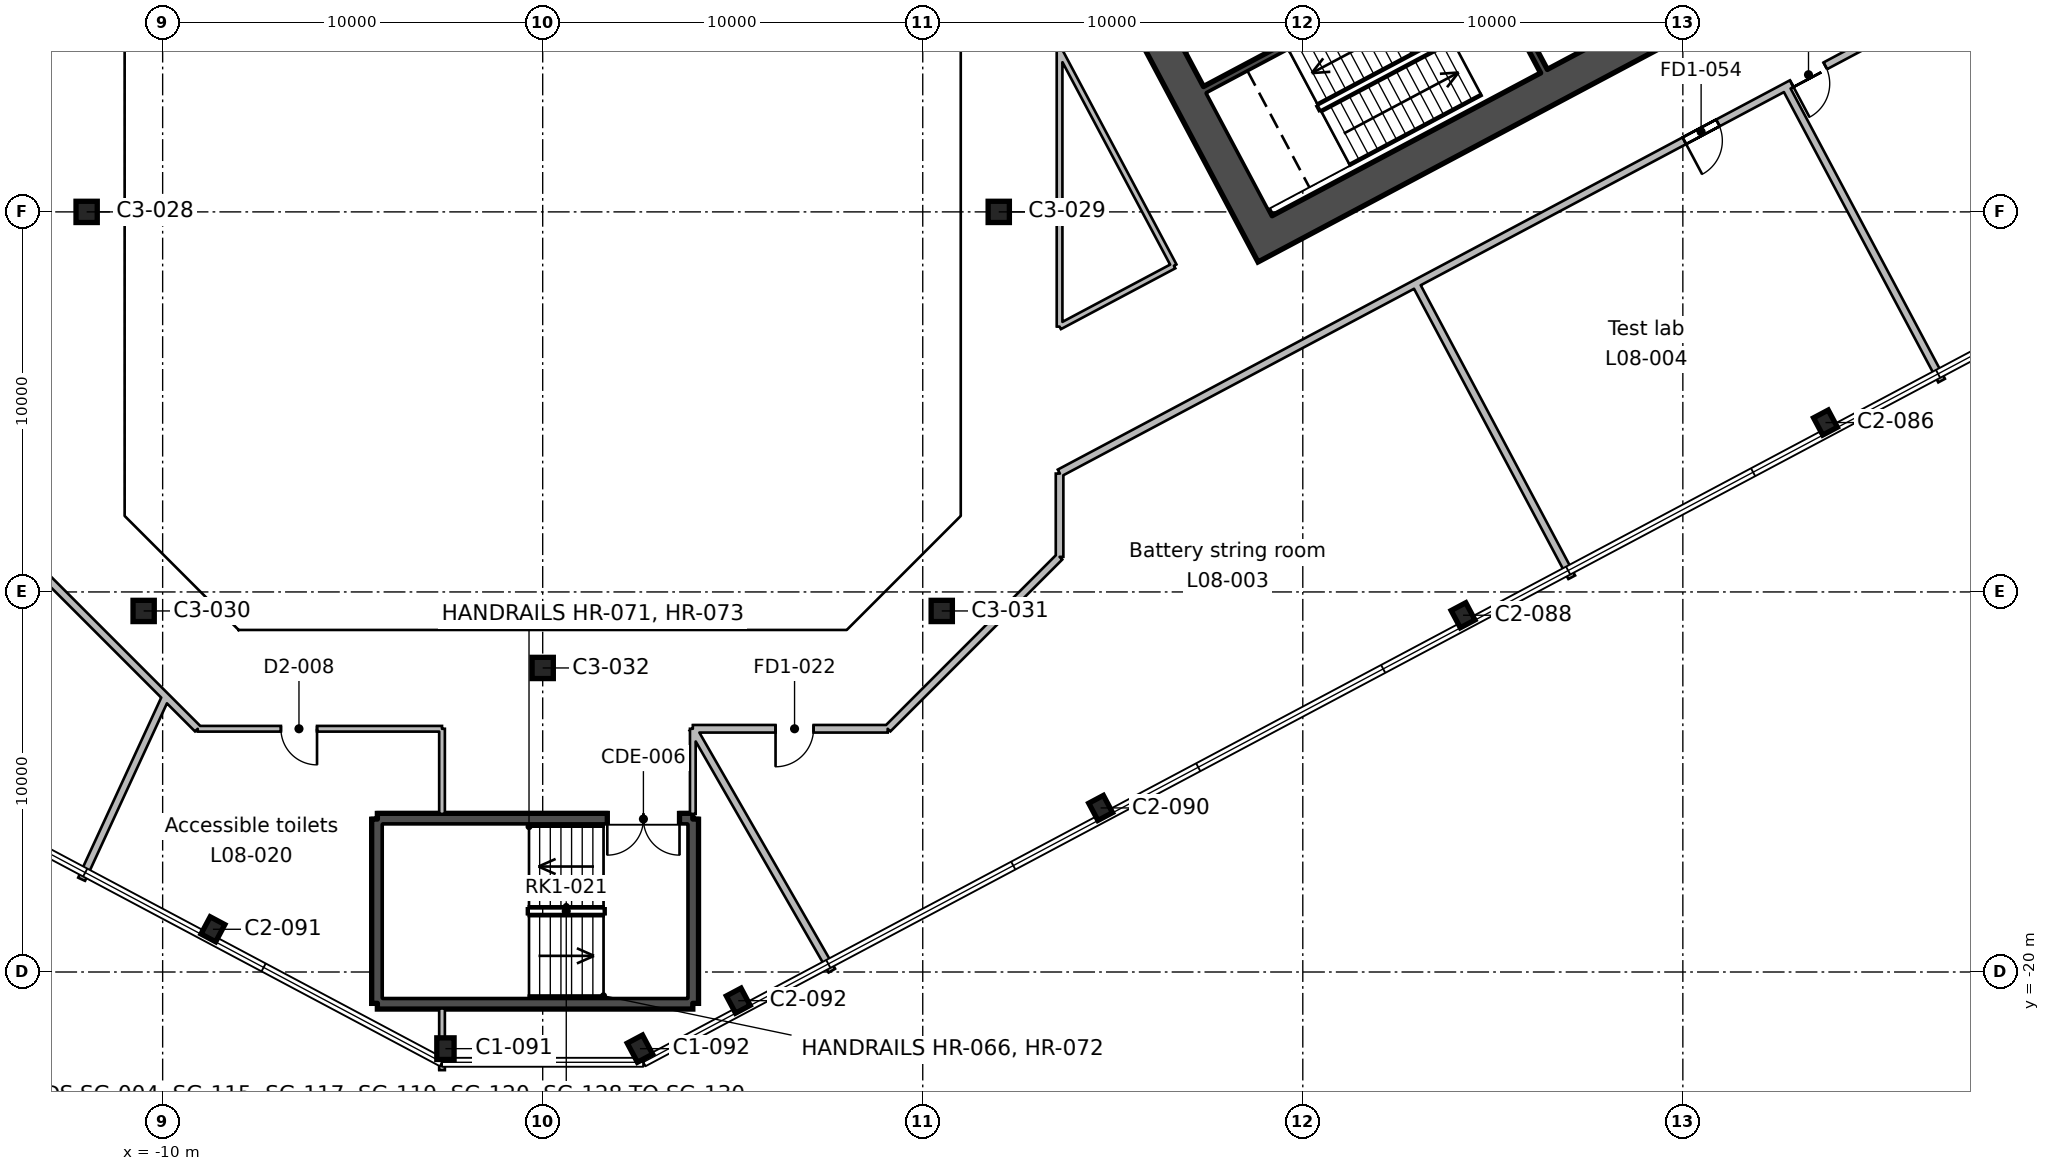
"""IFC4 building model, lengths in metres.
Left out: names, types, materials, properties, quantities, classifications, styles, units other than length and angle.
Written with IfcOpenShell. Run it as: python <this file> out.ifc"""

import sys

from ifc_helpers import new_model, si_unit, direction, frame, frame_2d, origin, origin_2d, place, context, subcontext, project, spatial, rectangle, hollow_rectangle, i_section, extrude, element, fill, save


model = new_model("IFC4")
c1 = context("Model", 3, precision=1e-05, world=origin(), true_north=direction((0.0, 1.0)))
c2 = subcontext(c1, "Body", "Model", "MODEL_VIEW")
j1 = project(units=[si_unit("LENGTHUNIT", "METRE"), si_unit("PLANEANGLEUNIT", "RADIAN")], contexts=[c1])
p1 = place(None, origin())
s1 = spatial("IfcSite", under=j1, at=p1, CompositionType="ELEMENT")
p2 = place(p1, origin())
s2 = spatial("IfcBuilding", under=s1, at=p2, CompositionType="ELEMENT")
p3 = place(p2, frame((0.0, 0.0, 44.6)))
s3 = spatial("IfcBuildingStorey", under=s2, at=p3, CompositionType="ELEMENT", Elevation=44.6)
for number, where, z_axis, x_axis in (
    (1, (-2.559, -22.017, 0.0), (0.0, 0.0, 1.0), (1.0, 0.0, 0.0)),
    (2, (2.559, -22.017, 0.0), (0.0, 0.0, 1.0), (0.883, 0.469, 0.0)),
):
    element("IfcColumn", number, at=place(p3, frame(where, z_axis=z_axis, x_axis=x_axis)), inside=s3, PredefinedType="COLUMN", context=c2, shape_type="SweptSolid", body=[
        extrude(i_section(OverallWidth=0.455, OverallDepth=0.569, WebThickness=0.078, FlangeThickness=0.125, FilletRadius=0.015, at=origin_2d()), origin(), (0.0, 0.0, 1.0), 5.4),
    ])
for number, where, z_axis, x_axis in (
    (3, (5.146, -20.754, 0.0), (0.0, 0.0, 1.0), (0.883, 0.469, 0.0)),
    (4, (-8.677, -18.876, 0.0), (0.0, 0.0, 1.0), (0.883, -0.469, 0.0)),
    (5, (14.681, -15.683, 0.0), (0.0, 0.0, 1.0), (0.883, 0.469, 0.0)),
):
    element("IfcColumn", number, at=place(p3, frame(where, z_axis=z_axis, x_axis=x_axis)), inside=s3, PredefinedType="COLUMN", context=c2, shape_type="SweptSolid", body=[
        extrude(i_section(OverallWidth=0.437, OverallDepth=0.513, WebThickness=0.061, FlangeThickness=0.097, FilletRadius=0.015, at=origin_2d()), origin(), (0.0, 0.0, 1.0), 5.4),
    ])
p4 = place(p3, frame((0.0, -12.0, 0.0), z_axis=(0.0, 0.0, 1.0), x_axis=(1.0, 0.0, 0.0)))
e6 = element("IfcColumn", 6, at=p4, inside=s3, PredefinedType="COLUMN", context=c2, shape_type="SweptSolid", body=[
    extrude(hollow_rectangle(XDim=0.559, YDim=0.559, WallThickness=0.024, InnerFilletRadius=0.012, OuterFilletRadius=0.035, at=origin_2d()), origin(), (0.0, 0.0, 1.0), 5.4),
])
p5 = place(p3, frame((24.217, -10.613, 0.0), z_axis=(0.0, 0.0, 1.0), x_axis=(0.882947592859, 0.469471562786, 0.0)))
e7 = element("IfcColumn", 7, at=p5, inside=s3, PredefinedType="COLUMN", context=c2, shape_type="SweptSolid", body=[
    extrude(i_section(OverallWidth=0.437, OverallDepth=0.513, WebThickness=0.061, FlangeThickness=0.097, FilletRadius=0.015, at=origin_2d()), origin(), (0.0, 0.0, 1.0), 5.4),
])
for number, where, z_axis, x_axis in (
    (8, (-10.5, -10.5, 0.0), (0.0, 0.0, 1.0), (1.0, 0.0, 0.0)),
    (9, (10.5, -10.5, 0.0), (0.0, 0.0, 1.0), (1.0, 0.0, 0.0)),
):
    element("IfcColumn", number, at=place(p3, frame(where, z_axis=z_axis, x_axis=x_axis)), inside=s3, PredefinedType="COLUMN", context=c2, shape_type="SweptSolid", body=[
        extrude(hollow_rectangle(XDim=0.559, YDim=0.559, WallThickness=0.024, InnerFilletRadius=0.012, OuterFilletRadius=0.035, at=origin_2d()), origin(), (0.0, 0.0, 1.0), 5.4),
    ])
p6 = place(p3, frame((33.753, -5.543, 0.0), z_axis=(0.0, 0.0, 1.0), x_axis=(0.882947592859, 0.469471562786, 0.0)))
e10 = element("IfcColumn", 10, at=p6, inside=s3, PredefinedType="COLUMN", context=c2, shape_type="SweptSolid", body=[
    extrude(i_section(OverallWidth=0.437, OverallDepth=0.513, WebThickness=0.061, FlangeThickness=0.097, FilletRadius=0.015, at=origin_2d()), origin(), (0.0, 0.0, 1.0), 5.4),
])
for number, where, z_axis, x_axis in (
    (11, (-12.0, 0.0, 0.0), (0.0, 0.0, 1.0), (1.0, 0.0, 0.0)),
    (12, (12.0, 0.0, 0.0), (0.0, 0.0, 1.0), (1.0, 0.0, 0.0)),
):
    element("IfcColumn", number, at=place(p3, frame(where, z_axis=z_axis, x_axis=x_axis)), inside=s3, PredefinedType="COLUMN", context=c2, shape_type="SweptSolid", body=[
        extrude(hollow_rectangle(XDim=0.559, YDim=0.559, WallThickness=0.024, InnerFilletRadius=0.012, OuterFilletRadius=0.035, at=origin_2d()), origin(), (0.0, 0.0, 1.0), 5.4),
    ])
p7 = place(p3, frame((19.219, -1.107, 0.0), z_axis=(0.0, 0.0, 1.0), x_axis=(-0.46947084998, 0.882947971864, 0.0)))
e13 = element("IfcWall", 13, at=p7, inside=s3, PredefinedType="SHEAR", context=c2, shape_type="SweptSolid", body=[
    extrude(rectangle(XDim=20.0, YDim=0.9, at=frame_2d((10.0, 0.0))), origin(), (0.0, 0.0, 1.0), 5.4),
])
p8 = place(p7, frame((7.0, 0.0, 0.0)))
e14 = element("IfcOpeningElement", 14, at=p8, cuts=e13, PredefinedType="OPENING", context=c2, shape_type="SweptSolid", body=[
    extrude(rectangle(XDim=2.4, YDim=2.4, at=frame_2d((1.2, 1.2))), frame((0.0, 0.46, 0.0), z_axis=(0.0, -1.0, 0.0), x_axis=(1.0, 0.0, 0.0)), (0.0, 0.0, 1.0), 0.92),
])
p9 = place(p3, frame((19.405, -0.498, 0.0), z_axis=(0.0, 0.0, 1.0), x_axis=(0.88294509198, 0.469476266226, 0.0)))
e15 = element("IfcWall", 15, at=p9, inside=s3, PredefinedType="SHEAR", context=c2, shape_type="SweptSolid", body=[
    extrude(rectangle(XDim=20.2, YDim=0.9, at=frame_2d((10.1, 0.0))), origin(), (0.0, 0.0, 1.0), 5.4),
])
p10 = place(p3, frame((26.346, 3.702, 0.0), z_axis=(0.0, 0.0, 1.0), x_axis=(-0.469480409012, 0.88294288918, 0.0)))
e16 = element("IfcWall", 16, at=p10, inside=s3, PredefinedType="SHEAR", context=c2, shape_type="SweptSolid", body=[
    extrude(rectangle(XDim=7.3, YDim=0.2, at=frame_2d((3.65, 0.0))), origin(), (0.0, 0.0, 1.0), 5.4),
])
p11 = place(p10, frame((1.3, 0.0, 0.0)))
e17 = element("IfcOpeningElement", 17, at=p11, cuts=e16, PredefinedType="OPENING", context=c2, shape_type="SweptSolid", body=[
    extrude(rectangle(XDim=1.2, YDim=2.1, at=frame_2d((0.6, 1.05))), frame((0.0, 0.11, 0.0), z_axis=(0.0, -1.0, 0.0), x_axis=(1.0, 0.0, 0.0)), (0.0, 0.0, 1.0), 0.22),
])
p12 = place(p3, frame((17.434, 3.21, 0.0), z_axis=(0.0, 0.0, 1.0), x_axis=(0.882940221191, 0.469485426614, 0.0)))
e18 = element("IfcWall", 18, at=p12, inside=s3, PredefinedType="SHEAR", context=c2, shape_type="SweptSolid", body=[
    extrude(rectangle(XDim=8.0, YDim=0.2, at=frame_2d((4.0, 0.0))), origin(), (0.0, 0.0, 1.0), 5.4),
])
p13 = place(p3, frame((3.95, -15.975, 0.0), z_axis=(0.0, 0.0, 1.0), x_axis=(0.0, -1.0, 0.0)))
e19 = element("IfcWall", 19, at=p13, inside=s3, PredefinedType="SHEAR", context=c2, shape_type="SweptSolid", body=[
    extrude(rectangle(XDim=4.85, YDim=0.3, at=frame_2d((2.425, 0.0))), origin(), (0.0, 0.0, 1.0), 5.4),
])
p14 = place(p3, frame((3.95, -20.825, 0.0), z_axis=(0.0, 0.0, 1.0), x_axis=(-1.0, 0.0, 0.0)))
e20 = element("IfcWall", 20, at=p14, inside=s3, PredefinedType="SHEAR", context=c2, shape_type="SweptSolid", body=[
    extrude(rectangle(XDim=8.3, YDim=0.3, at=frame_2d((4.15, 0.0))), origin(), (0.0, 0.0, 1.0), 5.4),
])
p15 = place(p3, frame((-4.35, -20.825, 0.0), z_axis=(0.0, 0.0, 1.0), x_axis=(0.0, 1.0, 0.0)))
e21 = element("IfcWall", 21, at=p15, inside=s3, PredefinedType="SHEAR", context=c2, shape_type="SweptSolid", body=[
    extrude(rectangle(XDim=4.85, YDim=0.3, at=frame_2d((2.425, 0.0))), origin(), (0.0, 0.0, 1.0), 5.4),
])
p16 = place(p3, frame((-4.35, -15.975, 0.0), z_axis=(0.0, 0.0, 1.0), x_axis=(1.0, 0.0, 0.0)))
e22 = element("IfcWall", 22, at=p16, inside=s3, PredefinedType="SHEAR", context=c2, shape_type="SweptSolid", body=[
    extrude(rectangle(XDim=8.3, YDim=0.3, at=frame_2d((4.15, 0.0))), origin(), (0.0, 0.0, 1.0), 5.4),
])
p17 = place(p16, frame((6.05, 0.0, 0.0)))
e23 = element("IfcOpeningElement", 23, at=p17, cuts=e22, PredefinedType="OPENING", context=c2, shape_type="SweptSolid", body=[
    extrude(rectangle(XDim=1.9, YDim=2.1, at=frame_2d((0.95, 1.05))), frame((0.0, 0.16, 0.0), z_axis=(0.0, -1.0, 0.0), x_axis=(1.0, 0.0, 0.0)), (0.0, 0.0, 1.0), 0.32),
])
p18 = place(p3, frame((-20.142, 0.46, 0.0), z_axis=(0.0, 0.0, 1.0), x_axis=(0.469506937019, 0.882928783136, 0.0)))
e24 = element("IfcWall", 24, at=p18, inside=s3, PredefinedType="PARTITIONING", context=c2, shape_type="SweptSolid", body=[
    extrude(rectangle(XDim=18.1, YDim=0.15, at=frame_2d((9.05, 0.0))), origin(), (0.0, 0.0, 1.0), 4.95),
])
p19 = place(p18, frame((8.55, 0.0, 0.0)))
e25 = element("IfcOpeningElement", 25, at=p19, cuts=e24, PredefinedType="OPENING", context=c2, shape_type="SweptSolid", body=[
    extrude(rectangle(XDim=1.0, YDim=2.1, at=frame_2d((0.5, 1.05))), frame((0.0, 0.085, 0.0), z_axis=(0.0, -1.0, 0.0), x_axis=(1.0, 0.0, 0.0)), (0.0, 0.0, 1.0), 0.17),
])
p20 = place(p3, frame((-9.918, -12.759, 0.0), z_axis=(0.0, 0.0, 1.0), x_axis=(-0.707106781187, 0.707106781187, 0.0)))
e26 = element("IfcWall", 26, at=p20, inside=s3, PredefinedType="PARTITIONING", context=c2, shape_type="SweptSolid", body=[
    extrude(rectangle(XDim=5.207, YDim=0.2, at=frame_2d((2.604, 0.0))), origin(), (0.0, 0.0, 1.0), 4.95),
])
p21 = place(p3, frame((-9.918, -12.759, 0.0), z_axis=(0.0, 0.0, 1.0), x_axis=(-0.41878582264, -0.908085037183, 0.0)))
e27 = element("IfcWall", 27, at=p21, inside=s3, PredefinedType="PARTITIONING", context=c2, shape_type="SweptSolid", body=[
    extrude(rectangle(XDim=5.287, YDim=0.2, at=frame_2d((2.644, 0.0))), origin(), (0.0, 0.0, 1.0), 4.95),
])
p22 = place(p3, frame((-3.888, -13.6, 0.0), z_axis=(0.0, 0.0, 1.0), x_axis=(-1.0, 0.0, 0.0)))
e28 = element("IfcWall", 28, at=p22, inside=s3, PredefinedType="PARTITIONING", context=c2, shape_type="SweptSolid", body=[
    extrude(rectangle(XDim=5.189, YDim=0.15, at=frame_2d((2.594, 0.0))), origin(), (0.0, 0.0, 1.0), 4.95),
])
p23 = place(p22, frame((2.05, 0.0, 0.0)))
e29 = element("IfcOpeningElement", 29, at=p23, cuts=e28, PredefinedType="OPENING", context=c2, shape_type="SweptSolid", body=[
    extrude(rectangle(XDim=0.95, YDim=2.1, at=frame_2d((0.475, 1.05))), frame((0.0, 0.085, 0.0), z_axis=(0.0, -1.0, 0.0), x_axis=(1.0, 0.0, 0.0)), (0.0, 0.0, 1.0), 0.17),
])
p24 = place(p3, frame((-9.077, -13.6, 0.0), z_axis=(0.0, 0.0, 1.0), x_axis=(-0.707106781187, 0.707106781187, 0.0)))
e30 = element("IfcWall", 30, at=p24, inside=s3, PredefinedType="PARTITIONING", context=c2, shape_type="SweptSolid", body=[
    extrude(rectangle(XDim=1.189, YDim=0.2, at=frame_2d((0.595, 0.0))), origin(), (0.0, 0.0, 1.0), 4.95),
])
p25 = place(p3, frame((-2.649, -15.84, 0.0), z_axis=(0.0, 0.0, 1.0), x_axis=(0.0, 1.0, 0.0)))
e31 = element("IfcWall", 31, at=p25, inside=s3, PredefinedType="PARTITIONING", context=c2, shape_type="SweptSolid", body=[
    extrude(rectangle(XDim=2.24, YDim=0.15, at=frame_2d((1.12, 0.0))), origin(), (0.0, 0.0, 1.0), 4.95),
])
p26 = place(p3, frame((-2.649, -13.6, 0.0), z_axis=(0.0, 0.0, 1.0), x_axis=(-1.0, 0.0, 0.0)))
e32 = element("IfcWall", 32, at=p26, inside=s3, PredefinedType="PARTITIONING", context=c2, shape_type="SweptSolid", body=[
    extrude(rectangle(XDim=1.239, YDim=0.15, at=frame_2d((0.62, 0.0))), origin(), (0.0, 0.0, 1.0), 4.95),
])
p27 = place(p3, frame((-2.649, -20.96, 0.0), z_axis=(0.0, 0.0, 1.0), x_axis=(0.0, -1.0, 0.0)))
e33 = element("IfcWall", 33, at=p27, inside=s3, PredefinedType="PARTITIONING", context=c2, shape_type="SweptSolid", body=[
    extrude(rectangle(XDim=1.622, YDim=0.15, at=frame_2d((0.811, 0.0))), origin(), (0.0, 0.0, 1.0), 4.95),
])
p28 = place(p3, frame((3.95, -13.6, 0.0), z_axis=(0.0, 0.0, 1.0), x_axis=(0.0, -1.0, 0.0)))
e34 = element("IfcWall", 34, at=p28, inside=s3, PredefinedType="PARTITIONING", context=c2, shape_type="SweptSolid", body=[
    extrude(rectangle(XDim=2.24, YDim=0.15, at=frame_2d((1.12, 0.0))), origin(), (0.0, 0.0, 1.0), 4.95),
])
p29 = place(p3, frame((13.6, -6.885, 0.0), z_axis=(0.0, 0.0, 1.0), x_axis=(0.0, -1.0, 0.0)))
e35 = element("IfcWall", 35, at=p29, inside=s3, PredefinedType="PARTITIONING", context=c2, shape_type="SweptSolid", body=[
    extrude(rectangle(XDim=2.192, YDim=0.2, at=frame_2d((1.096, 0.0))), origin(), (0.0, 0.0, 1.0), 4.95),
])
p30 = place(p3, frame((13.6, -9.077, 0.0), z_axis=(0.0, 0.0, 1.0), x_axis=(-0.707106781187, -0.707106781187, 0.0)))
e36 = element("IfcWall", 36, at=p30, inside=s3, PredefinedType="PARTITIONING", context=c2, shape_type="SweptSolid", body=[
    extrude(rectangle(XDim=6.397, YDim=0.2, at=frame_2d((3.198, 0.0))), origin(), (0.0, 0.0, 1.0), 4.95),
])
p31 = place(p3, frame((9.077, -13.6, 0.0), z_axis=(0.0, 0.0, 1.0), x_axis=(-1.0, 0.0, 0.0)))
e37 = element("IfcWall", 37, at=p31, inside=s3, PredefinedType="PARTITIONING", context=c2, shape_type="SweptSolid", body=[
    extrude(rectangle(XDim=5.127, YDim=0.2, at=frame_2d((2.563, 0.0))), origin(), (0.0, 0.0, 1.0), 4.95),
])
p32 = place(p31, frame((1.95, 0.0, 0.0)))
e38 = element("IfcOpeningElement", 38, at=p32, cuts=e37, PredefinedType="OPENING", context=c2, shape_type="SweptSolid", body=[
    extrude(rectangle(XDim=1.0, YDim=2.1, at=frame_2d((0.5, 1.05))), frame((0.0, 0.11, 0.0), z_axis=(0.0, -1.0, 0.0), x_axis=(1.0, 0.0, 0.0)), (0.0, 0.0, 1.0), 0.22),
])
p33 = place(p3, frame((7.609, -19.965, 0.0), z_axis=(0.0, 0.0, 1.0), x_axis=(-0.498375530061, 0.866961262708, 0.0)))
e39 = element("IfcWall", 39, at=p33, inside=s3, PredefinedType="PARTITIONING", context=c2, shape_type="SweptSolid", body=[
    extrude(rectangle(XDim=7.342, YDim=0.2, at=frame_2d((3.671, 0.0))), origin(), (0.0, 0.0, 1.0), 4.95),
])
p34 = place(p3, frame((22.968, -1.888, 0.0), z_axis=(0.0, 0.0, 1.0), x_axis=(0.469461194384, -0.882953105758, 0.0)))
e40 = element("IfcWall", 40, at=p34, inside=s3, PredefinedType="PARTITIONING", context=c2, shape_type="SweptSolid", body=[
    extrude(rectangle(XDim=8.75, YDim=0.2, at=frame_2d((4.375, 0.0))), origin(), (0.0, 0.0, 1.0), 4.95),
])
p35 = place(p3, frame((47.301, 11.05, 0.0), z_axis=(0.0, 0.0, 1.0), x_axis=(-0.882949285086, -0.469468380155, 0.0)))
e41 = element("IfcWall", 41, at=p35, inside=s3, PredefinedType="PARTITIONING", context=c2, shape_type="SweptSolid", body=[
    extrude(rectangle(XDim=38.169, YDim=0.2, at=frame_2d((19.084, 0.0))), origin(), (0.0, 0.0, 1.0), 4.95),
])
p36 = place(p35, frame((18.55, 0.0, 0.0)))
e42 = element("IfcOpeningElement", 42, at=p36, cuts=e41, PredefinedType="OPENING", context=c2, shape_type="SweptSolid", body=[
    extrude(rectangle(XDim=1.0, YDim=2.1, at=frame_2d((0.5, 1.05))), frame((0.0, 0.11, 0.0), z_axis=(0.0, -1.0, 0.0), x_axis=(1.0, 0.0, 0.0)), (0.0, 0.0, 1.0), 0.22),
])
p37 = place(p35, frame((15.35, 0.0, 0.0)))
e43 = element("IfcOpeningElement", 43, at=p37, cuts=e41, PredefinedType="OPENING", context=c2, shape_type="SweptSolid", body=[
    extrude(rectangle(XDim=1.0, YDim=2.1, at=frame_2d((0.5, 1.05))), frame((0.0, 0.11, 0.0), z_axis=(0.0, -1.0, 0.0), x_axis=(1.0, 0.0, 0.0)), (0.0, 0.0, 1.0), 0.22),
])
p38 = place(p3, frame((36.809, -4.439, 0.0), z_axis=(0.0, 0.0, 1.0), x_axis=(-0.469482945701, 0.882941540361, 0.0)))
e44 = element("IfcWall", 44, at=p38, inside=s3, PredefinedType="PARTITIONING", context=c2, shape_type="SweptSolid", body=[
    extrude(rectangle(XDim=8.75, YDim=0.2, at=frame_2d((4.375, 0.0))), origin(), (0.0, 0.0, 1.0), 4.95),
])
p39 = place(p3, frame((13.6, 4.243, 0.0), z_axis=(0.0, 0.0, 1.0), x_axis=(0.0, -1.0, 0.0)))
e45 = element("IfcWall", 45, at=p39, inside=s3, PredefinedType="PARTITIONING", context=c2, shape_type="SweptSolid", body=[
    extrude(rectangle(XDim=7.262, YDim=0.15, at=frame_2d((3.631, 0.0))), origin(), (0.0, 0.0, 1.0), 4.95),
])
p40 = place(p3, frame((13.6, -3.019, 0.0), z_axis=(0.0, 0.0, 1.0), x_axis=(0.8828717575, 0.469614160571, 0.0)))
e46 = element("IfcWall", 46, at=p40, inside=s3, PredefinedType="PARTITIONING", context=c2, shape_type="SweptSolid", body=[
    extrude(rectangle(XDim=3.409, YDim=0.15, at=frame_2d((1.705, 0.0))), origin(), (0.0, 0.0, 1.0), 4.95),
])
p41 = place(p3, frame((16.61, -1.418, 0.0), z_axis=(0.0, 0.0, 1.0), x_axis=(-0.469479085554, 0.882943592891, 0.0)))
e47 = element("IfcWall", 47, at=p41, inside=s3, PredefinedType="PARTITIONING", context=c2, shape_type="SweptSolid", body=[
    extrude(rectangle(XDim=6.411, YDim=0.15, at=frame_2d((3.206, 0.0))), origin(), (0.0, 0.0, 1.0), 4.95),
])
p42 = place(p17, frame((1.9, 0.0, 0.0), z_axis=(0.0, 0.0, 1.0), x_axis=(-1.0, 0.0, 0.0)))
e48 = element("IfcDoor", 48, at=p42, inside=s3, OperationType="DOUBLE_DOOR_SINGLE_SWING", PredefinedType="DOOR", context=c2, shape_type="SweptSolid", body=[
    extrude(rectangle(XDim=1.9, YDim=2.1, at=frame_2d((0.95, 1.05))), frame((0.0, 0.025, 0.0), z_axis=(0.0, -1.0, 0.0), x_axis=(1.0, 0.0, 0.0)), (0.0, 0.0, 1.0), 0.05),
])
fill(e23, e48)
p43 = place(p32, origin())
e49 = element("IfcDoor", 49, at=p43, inside=s3, OperationType="SINGLE_SWING_RIGHT", PredefinedType="DOOR", context=c2, shape_type="SweptSolid", body=[
    extrude(rectangle(XDim=1.0, YDim=2.1, at=frame_2d((0.5, 1.05))), frame((0.0, 0.025, 0.0), z_axis=(0.0, -1.0, 0.0), x_axis=(1.0, 0.0, 0.0)), (0.0, 0.0, 1.0), 0.05),
])
fill(e38, e49)
p44 = place(p36, origin())
e50 = element("IfcDoor", 50, at=p44, inside=s3, OperationType="SINGLE_SWING_RIGHT", PredefinedType="DOOR", context=c2, shape_type="SweptSolid", body=[
    extrude(rectangle(XDim=1.0, YDim=2.1, at=frame_2d((0.5, 1.05))), frame((0.0, 0.025, 0.0), z_axis=(0.0, -1.0, 0.0), x_axis=(1.0, 0.0, 0.0)), (0.0, 0.0, 1.0), 0.05),
])
fill(e42, e50)
p45 = place(p37, origin())
e51 = element("IfcDoor", 51, at=p45, inside=s3, OperationType="SINGLE_SWING_RIGHT", PredefinedType="DOOR", context=c2, shape_type="SweptSolid", body=[
    extrude(rectangle(XDim=1.0, YDim=2.1, at=frame_2d((0.5, 1.05))), frame((0.0, 0.025, 0.0), z_axis=(0.0, -1.0, 0.0), x_axis=(1.0, 0.0, 0.0)), (0.0, 0.0, 1.0), 0.05),
])
fill(e43, e51)
p46 = place(p23, origin())
e52 = element("IfcDoor", 52, at=p46, inside=s3, OperationType="SINGLE_SWING_LEFT", PredefinedType="DOOR", context=c2, shape_type="SweptSolid", body=[
    extrude(rectangle(XDim=0.95, YDim=2.1, at=frame_2d((0.475, 1.05))), frame((0.0, 0.025, 0.0), z_axis=(0.0, -1.0, 0.0), x_axis=(1.0, 0.0, 0.0)), (0.0, 0.0, 1.0), 0.05),
])
fill(e29, e52)
save(model, sys.argv[1])
